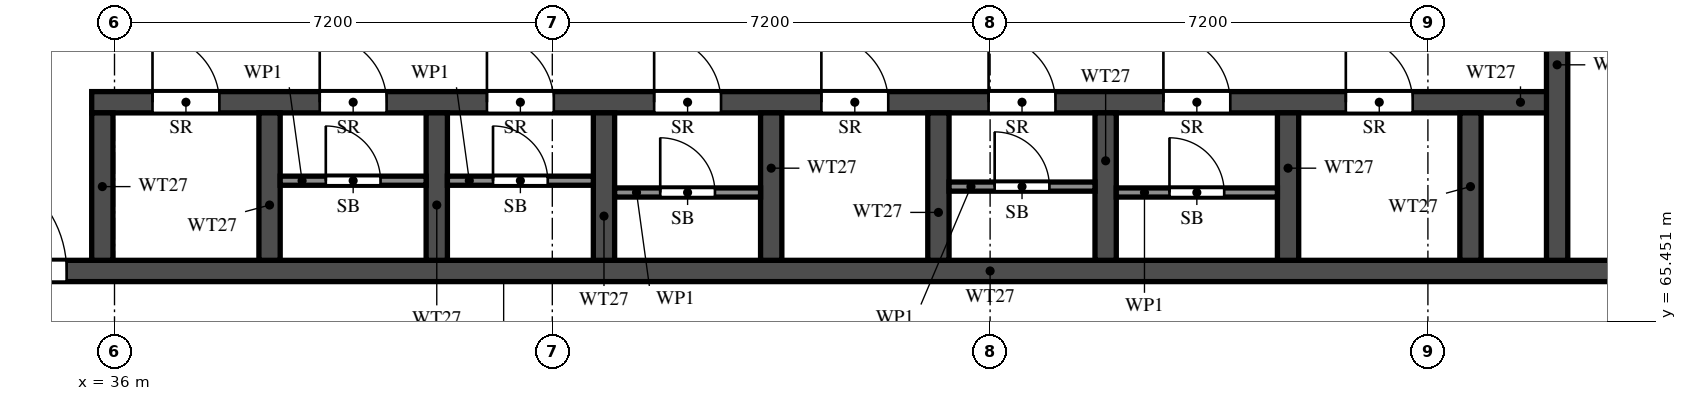
"""IFC4 building model, lengths in metres.
Left out: names, types, materials, properties, quantities, classifications, styles, units other than length and angle.
Written with IfcOpenShell. Run it as: python <this file> out.ifc"""

import sys

from ifc_helpers import new_model, si_unit, direction, frame, frame_2d, origin, place, context, subcontext, project, spatial, rectangle, extrude, element, fill, save


model = new_model("IFC4")
c1 = context("Model", 3, precision=1e-05, world=origin(), true_north=direction((0.0, 1.0)))
c2 = subcontext(c1, "Body", "Model", "MODEL_VIEW")
j1 = project(units=[si_unit("LENGTHUNIT", "METRE"), si_unit("PLANEANGLEUNIT", "RADIAN")], contexts=[c1])
p1 = place(None, origin())
s1 = spatial("IfcSite", under=j1, at=p1, CompositionType="ELEMENT")
p2 = place(p1, origin())
s2 = spatial("IfcBuilding", under=s1, at=p2, CompositionType="ELEMENT")
p3 = place(p2, frame((0.0, 0.0, 164.0)))
s3 = spatial("IfcBuildingStorey", under=s2, at=p3, CompositionType="ELEMENT", Elevation=164.0)
p4 = place(p3, frame((29.7, 66.275, 0.0), z_axis=(0.0, 0.0, 1.0), x_axis=(1.0, 0.0, 0.0)))
e1 = element("IfcWall", 1, at=p4, inside=s3, PredefinedType="SHEAR", context=c2, shape_type="SweptSolid", body=[
    extrude(rectangle(XDim=41.4, YDim=0.35, at=frame_2d((20.7, 0.0))), origin(), (0.0, 0.0, 1.0), 3.2),
])
p5 = place(p4, frame((0.925, 0.0, 0.0)))
e2 = element("IfcOpeningElement", 2, at=p5, cuts=e1, PredefinedType="OPENING", context=c2, shape_type="SweptSolid", body=[
    extrude(rectangle(XDim=1.1, YDim=2.1, at=frame_2d((0.55, 1.05))), frame((0.0, 0.185, 0.0), z_axis=(0.0, -1.0, 0.0), x_axis=(1.0, 0.0, 0.0)), (0.0, 0.0, 1.0), 0.37),
])
p6 = place(p4, frame((3.712, 0.0, 0.0)))
e3 = element("IfcOpeningElement", 3, at=p6, cuts=e1, PredefinedType="OPENING", context=c2, shape_type="SweptSolid", body=[
    extrude(rectangle(XDim=1.8, YDim=2.1, at=frame_2d((0.9, 1.05))), frame((0.0, 0.185, 0.0), z_axis=(0.0, -1.0, 0.0), x_axis=(1.0, 0.0, 0.0)), (0.0, 0.0, 1.0), 0.37),
])
p7 = place(p3, frame((35.625, 69.05, 0.0), z_axis=(0.0, 0.0, 1.0), x_axis=(1.0, 0.0, 0.0)))
e4 = element("IfcWall", 4, at=p7, inside=s3, PredefinedType="SHEAR", context=c2, shape_type="SweptSolid", body=[
    extrude(rectangle(XDim=24.1, YDim=0.35, at=frame_2d((12.05, 0.0))), origin(), (0.0, 0.0, 1.0), 3.2),
])
p8 = place(p7, frame((1.0, 0.0, 0.0)))
e5 = element("IfcOpeningElement", 5, at=p8, cuts=e4, PredefinedType="OPENING", context=c2, shape_type="SweptSolid", body=[
    extrude(rectangle(XDim=1.1, YDim=2.1, at=frame_2d((0.55, 1.05))), frame((0.0, 0.185, 0.0), z_axis=(0.0, -1.0, 0.0), x_axis=(1.0, 0.0, 0.0)), (0.0, 0.0, 1.0), 0.37),
])
p9 = place(p7, frame((3.75, 0.0, 0.0)))
e6 = element("IfcOpeningElement", 6, at=p9, cuts=e4, PredefinedType="OPENING", context=c2, shape_type="SweptSolid", body=[
    extrude(rectangle(XDim=1.1, YDim=2.1, at=frame_2d((0.55, 1.05))), frame((0.0, 0.185, 0.0), z_axis=(0.0, -1.0, 0.0), x_axis=(1.0, 0.0, 0.0)), (0.0, 0.0, 1.0), 0.37),
])
p10 = place(p7, frame((6.5, 0.0, 0.0)))
e7 = element("IfcOpeningElement", 7, at=p10, cuts=e4, PredefinedType="OPENING", context=c2, shape_type="SweptSolid", body=[
    extrude(rectangle(XDim=1.1, YDim=2.1, at=frame_2d((0.55, 1.05))), frame((0.0, 0.185, 0.0), z_axis=(0.0, -1.0, 0.0), x_axis=(1.0, 0.0, 0.0)), (0.0, 0.0, 1.0), 0.37),
])
p11 = place(p7, frame((9.25, 0.0, 0.0)))
e8 = element("IfcOpeningElement", 8, at=p11, cuts=e4, PredefinedType="OPENING", context=c2, shape_type="SweptSolid", body=[
    extrude(rectangle(XDim=1.1, YDim=2.1, at=frame_2d((0.55, 1.05))), frame((0.0, 0.185, 0.0), z_axis=(0.0, -1.0, 0.0), x_axis=(1.0, 0.0, 0.0)), (0.0, 0.0, 1.0), 0.37),
])
p12 = place(p7, frame((12.0, 0.0, 0.0)))
e9 = element("IfcOpeningElement", 9, at=p12, cuts=e4, PredefinedType="OPENING", context=c2, shape_type="SweptSolid", body=[
    extrude(rectangle(XDim=1.1, YDim=2.1, at=frame_2d((0.55, 1.05))), frame((0.0, 0.185, 0.0), z_axis=(0.0, -1.0, 0.0), x_axis=(1.0, 0.0, 0.0)), (0.0, 0.0, 1.0), 0.37),
])
p13 = place(p7, frame((14.75, 0.0, 0.0)))
e10 = element("IfcOpeningElement", 10, at=p13, cuts=e4, PredefinedType="OPENING", context=c2, shape_type="SweptSolid", body=[
    extrude(rectangle(XDim=1.1, YDim=2.1, at=frame_2d((0.55, 1.05))), frame((0.0, 0.185, 0.0), z_axis=(0.0, -1.0, 0.0), x_axis=(1.0, 0.0, 0.0)), (0.0, 0.0, 1.0), 0.37),
])
p14 = place(p7, frame((17.625, 0.0, 0.0)))
e11 = element("IfcOpeningElement", 11, at=p14, cuts=e4, PredefinedType="OPENING", context=c2, shape_type="SweptSolid", body=[
    extrude(rectangle(XDim=1.1, YDim=2.1, at=frame_2d((0.55, 1.05))), frame((0.0, 0.185, 0.0), z_axis=(0.0, -1.0, 0.0), x_axis=(1.0, 0.0, 0.0)), (0.0, 0.0, 1.0), 0.37),
])
p15 = place(p7, frame((20.625, 0.0, 0.0)))
e12 = element("IfcOpeningElement", 12, at=p15, cuts=e4, PredefinedType="OPENING", context=c2, shape_type="SweptSolid", body=[
    extrude(rectangle(XDim=1.1, YDim=2.1, at=frame_2d((0.55, 1.05))), frame((0.0, 0.185, 0.0), z_axis=(0.0, -1.0, 0.0), x_axis=(1.0, 0.0, 0.0)), (0.0, 0.0, 1.0), 0.37),
])
p16 = place(p3, frame((59.725, 66.45, 0.0), z_axis=(0.0, 0.0, 1.0), x_axis=(0.0, 1.0, 0.0)))
e13 = element("IfcWall", 13, at=p16, inside=s3, PredefinedType="SHEAR", context=c2, shape_type="SweptSolid", body=[
    extrude(rectangle(XDim=6.125, YDim=0.35, at=frame_2d((3.062, 0.0))), origin(), (0.0, 0.0, 1.0), 3.2),
])
p17 = place(p16, frame((3.85, 0.0, 0.0)))
e14 = element("IfcOpeningElement", 14, at=p17, cuts=e13, PredefinedType="OPENING", context=c2, shape_type="SweptSolid", body=[
    extrude(rectangle(XDim=1.2, YDim=2.1, at=frame_2d((0.6, 1.05))), frame((0.0, 0.185, 0.0), z_axis=(0.0, -1.0, 0.0), x_axis=(1.0, 0.0, 0.0)), (0.0, 0.0, 1.0), 0.37),
])
for number, where, z_axis, x_axis in (
    (15, (35.8, 66.45, 0.0), (0.0, 0.0, 1.0), (0.0, 1.0, 0.0)),
    (16, (38.55, 66.45, 0.0), (0.0, 0.0, 1.0), (0.0, 1.0, 0.0)),
    (17, (41.3, 66.45, 0.0), (0.0, 0.0, 1.0), (0.0, 1.0, 0.0)),
    (18, (44.05, 66.45, 0.0), (0.0, 0.0, 1.0), (0.0, 1.0, 0.0)),
    (19, (46.8, 66.45, 0.0), (0.0, 0.0, 1.0), (0.0, 1.0, 0.0)),
    (20, (49.55, 66.45, 0.0), (0.0, 0.0, 1.0), (0.0, 1.0, 0.0)),
    (21, (52.3, 66.45, 0.0), (0.0, 0.0, 1.0), (0.0, 1.0, 0.0)),
    (22, (55.3, 66.45, 0.0), (0.0, 0.0, 1.0), (0.0, 1.0, 0.0)),
    (23, (58.3, 66.45, 0.0), (0.0, 0.0, 1.0), (0.0, 1.0, 0.0)),
):
    element("IfcWall", number, at=place(p3, frame(where, z_axis=z_axis, x_axis=x_axis)), inside=s3, PredefinedType="SHEAR", context=c2, shape_type="SweptSolid", body=[
        extrude(rectangle(XDim=2.425, YDim=0.35, at=frame_2d((1.212, 0.0))), origin(), (0.0, 0.0, 1.0), 3.2),
    ])
p18 = place(p3, frame((38.725, 67.76, 0.0), z_axis=(0.0, 0.0, 1.0), x_axis=(1.0, 0.0, 0.0)))
e24 = element("IfcWall", 24, at=p18, inside=s3, PredefinedType="PARTITIONING", context=c2, shape_type="SweptSolid", body=[
    extrude(rectangle(XDim=2.4, YDim=0.15, at=frame_2d((1.2, 0.0))), origin(), (0.0, 0.0, 1.0), 3.2),
])
p19 = place(p18, frame((0.75, 0.0, 0.0)))
e25 = element("IfcOpeningElement", 25, at=p19, cuts=e24, PredefinedType="OPENING", context=c2, shape_type="SweptSolid", body=[
    extrude(rectangle(XDim=0.9, YDim=2.1, at=frame_2d((0.45, 1.05))), frame((0.0, 0.085, 0.0), z_axis=(0.0, -1.0, 0.0), x_axis=(1.0, 0.0, 0.0)), (0.0, 0.0, 1.0), 0.17),
])
p20 = place(p3, frame((41.475, 67.76, 0.0), z_axis=(0.0, 0.0, 1.0), x_axis=(1.0, 0.0, 0.0)))
e26 = element("IfcWall", 26, at=p20, inside=s3, PredefinedType="PARTITIONING", context=c2, shape_type="SweptSolid", body=[
    extrude(rectangle(XDim=2.4, YDim=0.15, at=frame_2d((1.2, 0.0))), origin(), (0.0, 0.0, 1.0), 3.2),
])
p21 = place(p20, frame((0.75, 0.0, 0.0)))
e27 = element("IfcOpeningElement", 27, at=p21, cuts=e26, PredefinedType="OPENING", context=c2, shape_type="SweptSolid", body=[
    extrude(rectangle(XDim=0.9, YDim=2.1, at=frame_2d((0.45, 1.05))), frame((0.0, 0.085, 0.0), z_axis=(0.0, -1.0, 0.0), x_axis=(1.0, 0.0, 0.0)), (0.0, 0.0, 1.0), 0.17),
])
p22 = place(p3, frame((44.225, 67.565, 0.0), z_axis=(0.0, 0.0, 1.0), x_axis=(1.0, 0.0, 0.0)))
e28 = element("IfcWall", 28, at=p22, inside=s3, PredefinedType="PARTITIONING", context=c2, shape_type="SweptSolid", body=[
    extrude(rectangle(XDim=2.4, YDim=0.15, at=frame_2d((1.2, 0.0))), origin(), (0.0, 0.0, 1.0), 3.2),
])
p23 = place(p22, frame((0.75, 0.0, 0.0)))
e29 = element("IfcOpeningElement", 29, at=p23, cuts=e28, PredefinedType="OPENING", context=c2, shape_type="SweptSolid", body=[
    extrude(rectangle(XDim=0.9, YDim=2.1, at=frame_2d((0.45, 1.05))), frame((0.0, 0.085, 0.0), z_axis=(0.0, -1.0, 0.0), x_axis=(1.0, 0.0, 0.0)), (0.0, 0.0, 1.0), 0.17),
])
p24 = place(p3, frame((49.725, 67.663, 0.0), z_axis=(0.0, 0.0, 1.0), x_axis=(1.0, 0.0, 0.0)))
e30 = element("IfcWall", 30, at=p24, inside=s3, PredefinedType="PARTITIONING", context=c2, shape_type="SweptSolid", body=[
    extrude(rectangle(XDim=2.4, YDim=0.15, at=frame_2d((1.2, 0.0))), origin(), (0.0, 0.0, 1.0), 3.2),
])
p25 = place(p24, frame((0.75, 0.0, 0.0)))
e31 = element("IfcOpeningElement", 31, at=p25, cuts=e30, PredefinedType="OPENING", context=c2, shape_type="SweptSolid", body=[
    extrude(rectangle(XDim=0.9, YDim=2.1, at=frame_2d((0.45, 1.05))), frame((0.0, 0.085, 0.0), z_axis=(0.0, -1.0, 0.0), x_axis=(1.0, 0.0, 0.0)), (0.0, 0.0, 1.0), 0.17),
])
p26 = place(p3, frame((52.475, 67.565, 0.0), z_axis=(0.0, 0.0, 1.0), x_axis=(1.0, 0.0, 0.0)))
e32 = element("IfcWall", 32, at=p26, inside=s3, PredefinedType="PARTITIONING", context=c2, shape_type="SweptSolid", body=[
    extrude(rectangle(XDim=2.65, YDim=0.15, at=frame_2d((1.325, 0.0))), origin(), (0.0, 0.0, 1.0), 3.2),
])
p27 = place(p26, frame((0.875, 0.0, 0.0)))
e33 = element("IfcOpeningElement", 33, at=p27, cuts=e32, PredefinedType="OPENING", context=c2, shape_type="SweptSolid", body=[
    extrude(rectangle(XDim=0.9, YDim=2.1, at=frame_2d((0.45, 1.05))), frame((0.0, 0.085, 0.0), z_axis=(0.0, -1.0, 0.0), x_axis=(1.0, 0.0, 0.0)), (0.0, 0.0, 1.0), 0.17),
])
p28 = place(p6, origin())
e34 = element("IfcDoor", 34, at=p28, inside=s3, OperationType="DOUBLE_DOOR_SINGLE_SWING", PredefinedType="DOOR", context=c2, shape_type="SweptSolid", body=[
    extrude(rectangle(XDim=1.8, YDim=2.1, at=frame_2d((0.9, 1.05))), frame((0.0, 0.025, 0.0), z_axis=(0.0, -1.0, 0.0), x_axis=(1.0, 0.0, 0.0)), (0.0, 0.0, 1.0), 0.05),
])
fill(e3, e34)
p29 = place(p8, origin())
e35 = element("IfcDoor", 35, at=p29, inside=s3, OperationType="SINGLE_SWING_RIGHT", PredefinedType="DOOR", context=c2, shape_type="SweptSolid", body=[
    extrude(rectangle(XDim=1.1, YDim=2.1, at=frame_2d((0.55, 1.05))), frame((0.0, 0.025, 0.0), z_axis=(0.0, -1.0, 0.0), x_axis=(1.0, 0.0, 0.0)), (0.0, 0.0, 1.0), 0.05),
])
fill(e5, e35)
p30 = place(p9, origin())
e36 = element("IfcDoor", 36, at=p30, inside=s3, OperationType="SINGLE_SWING_LEFT", PredefinedType="DOOR", context=c2, shape_type="SweptSolid", body=[
    extrude(rectangle(XDim=1.1, YDim=2.1, at=frame_2d((0.55, 1.05))), frame((0.0, 0.025, 0.0), z_axis=(0.0, -1.0, 0.0), x_axis=(1.0, 0.0, 0.0)), (0.0, 0.0, 1.0), 0.05),
])
fill(e6, e36)
p31 = place(p19, origin())
e37 = element("IfcDoor", 37, at=p31, inside=s3, OperationType="SINGLE_SWING_RIGHT", PredefinedType="DOOR", context=c2, shape_type="SweptSolid", body=[
    extrude(rectangle(XDim=0.9, YDim=2.1, at=frame_2d((0.45, 1.05))), frame((0.0, 0.025, 0.0), z_axis=(0.0, -1.0, 0.0), x_axis=(1.0, 0.0, 0.0)), (0.0, 0.0, 1.0), 0.05),
])
fill(e25, e37)
p32 = place(p10, origin())
e38 = element("IfcDoor", 38, at=p32, inside=s3, OperationType="SINGLE_SWING_RIGHT", PredefinedType="DOOR", context=c2, shape_type="SweptSolid", body=[
    extrude(rectangle(XDim=1.1, YDim=2.1, at=frame_2d((0.55, 1.05))), frame((0.0, 0.025, 0.0), z_axis=(0.0, -1.0, 0.0), x_axis=(1.0, 0.0, 0.0)), (0.0, 0.0, 1.0), 0.05),
])
fill(e7, e38)
p33 = place(p21, origin())
e39 = element("IfcDoor", 39, at=p33, inside=s3, OperationType="SINGLE_SWING_LEFT", PredefinedType="DOOR", context=c2, shape_type="SweptSolid", body=[
    extrude(rectangle(XDim=0.9, YDim=2.1, at=frame_2d((0.45, 1.05))), frame((0.0, 0.025, 0.0), z_axis=(0.0, -1.0, 0.0), x_axis=(1.0, 0.0, 0.0)), (0.0, 0.0, 1.0), 0.05),
])
fill(e27, e39)
p34 = place(p11, origin())
e40 = element("IfcDoor", 40, at=p34, inside=s3, OperationType="SINGLE_SWING_LEFT", PredefinedType="DOOR", context=c2, shape_type="SweptSolid", body=[
    extrude(rectangle(XDim=1.1, YDim=2.1, at=frame_2d((0.55, 1.05))), frame((0.0, 0.025, 0.0), z_axis=(0.0, -1.0, 0.0), x_axis=(1.0, 0.0, 0.0)), (0.0, 0.0, 1.0), 0.05),
])
fill(e8, e40)
p35 = place(p23, origin())
e41 = element("IfcDoor", 41, at=p35, inside=s3, OperationType="SINGLE_SWING_LEFT", PredefinedType="DOOR", context=c2, shape_type="SweptSolid", body=[
    extrude(rectangle(XDim=0.9, YDim=2.1, at=frame_2d((0.45, 1.05))), frame((0.0, 0.025, 0.0), z_axis=(0.0, -1.0, 0.0), x_axis=(1.0, 0.0, 0.0)), (0.0, 0.0, 1.0), 0.05),
])
fill(e29, e41)
p36 = place(p12, origin())
e42 = element("IfcDoor", 42, at=p36, inside=s3, OperationType="SINGLE_SWING_RIGHT", PredefinedType="DOOR", context=c2, shape_type="SweptSolid", body=[
    extrude(rectangle(XDim=1.1, YDim=2.1, at=frame_2d((0.55, 1.05))), frame((0.0, 0.025, 0.0), z_axis=(0.0, -1.0, 0.0), x_axis=(1.0, 0.0, 0.0)), (0.0, 0.0, 1.0), 0.05),
])
fill(e9, e42)
p37 = place(p13, origin())
e43 = element("IfcDoor", 43, at=p37, inside=s3, OperationType="SINGLE_SWING_LEFT", PredefinedType="DOOR", context=c2, shape_type="SweptSolid", body=[
    extrude(rectangle(XDim=1.1, YDim=2.1, at=frame_2d((0.55, 1.05))), frame((0.0, 0.025, 0.0), z_axis=(0.0, -1.0, 0.0), x_axis=(1.0, 0.0, 0.0)), (0.0, 0.0, 1.0), 0.05),
])
fill(e10, e43)
p38 = place(p25, origin())
e44 = element("IfcDoor", 44, at=p38, inside=s3, OperationType="SINGLE_SWING_LEFT", PredefinedType="DOOR", context=c2, shape_type="SweptSolid", body=[
    extrude(rectangle(XDim=0.9, YDim=2.1, at=frame_2d((0.45, 1.05))), frame((0.0, 0.025, 0.0), z_axis=(0.0, -1.0, 0.0), x_axis=(1.0, 0.0, 0.0)), (0.0, 0.0, 1.0), 0.05),
])
fill(e31, e44)
p39 = place(p14, origin())
e45 = element("IfcDoor", 45, at=p39, inside=s3, OperationType="SINGLE_SWING_RIGHT", PredefinedType="DOOR", context=c2, shape_type="SweptSolid", body=[
    extrude(rectangle(XDim=1.1, YDim=2.1, at=frame_2d((0.55, 1.05))), frame((0.0, 0.025, 0.0), z_axis=(0.0, -1.0, 0.0), x_axis=(1.0, 0.0, 0.0)), (0.0, 0.0, 1.0), 0.05),
])
fill(e11, e45)
p40 = place(p27, origin())
e46 = element("IfcDoor", 46, at=p40, inside=s3, OperationType="SINGLE_SWING_RIGHT", PredefinedType="DOOR", context=c2, shape_type="SweptSolid", body=[
    extrude(rectangle(XDim=0.9, YDim=2.1, at=frame_2d((0.45, 1.05))), frame((0.0, 0.025, 0.0), z_axis=(0.0, -1.0, 0.0), x_axis=(1.0, 0.0, 0.0)), (0.0, 0.0, 1.0), 0.05),
])
fill(e33, e46)
p41 = place(p15, origin())
e47 = element("IfcDoor", 47, at=p41, inside=s3, OperationType="SINGLE_SWING_RIGHT", PredefinedType="DOOR", context=c2, shape_type="SweptSolid", body=[
    extrude(rectangle(XDim=1.1, YDim=2.1, at=frame_2d((0.55, 1.05))), frame((0.0, 0.025, 0.0), z_axis=(0.0, -1.0, 0.0), x_axis=(1.0, 0.0, 0.0)), (0.0, 0.0, 1.0), 0.05),
])
fill(e12, e47)
save(model, sys.argv[1])
